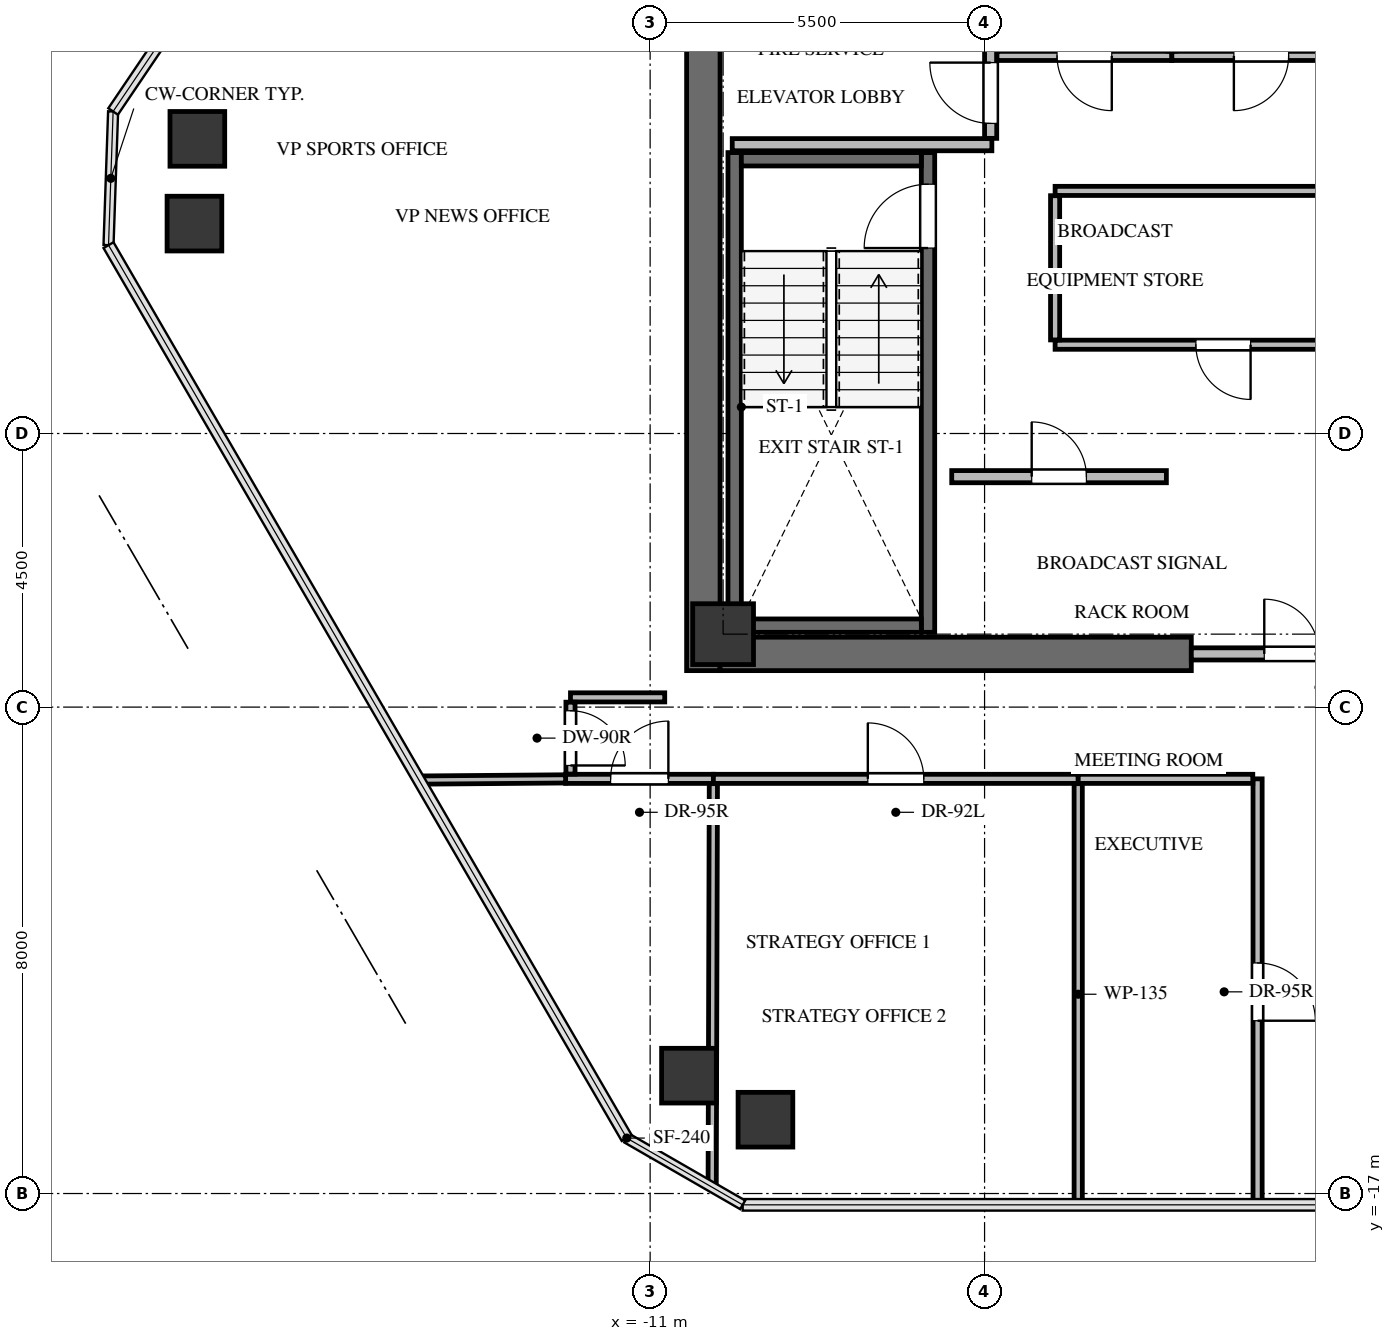
"""IFC4 building model, lengths in metres.
Left out: names, types, materials, properties, quantities, classifications, styles, units other than length and angle.
Written with IfcOpenShell. Run it as: python <this file> out.ifc"""

import sys

from ifc_helpers import new_model, si_unit, direction, frame, frame_2d, origin, origin_2d, place, context, subcontext, project, spatial, rectangle, extrude, source, transform, mapped, element, fill, save


model = new_model("IFC4")
c1 = context("Model", 3, precision=1e-05, world=origin(), true_north=direction((0.0, 1.0)))
c2 = subcontext(c1, "Body", "Model", "MODEL_VIEW")
j1 = project(units=[si_unit("LENGTHUNIT", "METRE"), si_unit("PLANEANGLEUNIT", "RADIAN")], contexts=[c1])
p1 = place(None, origin())
s1 = spatial("IfcSite", under=j1, at=p1, CompositionType="ELEMENT")
p2 = place(p1, origin())
s2 = spatial("IfcBuilding", under=s1, at=p2, CompositionType="ELEMENT")
p3 = place(p2, frame((0.0, 0.0, 228.2)))
s3 = spatial("IfcBuildingStorey", under=s2, at=p3, CompositionType="ELEMENT", Elevation=228.2)
p4 = place(p3, frame((-10.125, -8.4, 0.0), z_axis=(0.0, 0.0, 1.0), x_axis=(0.0, 1.0, 0.0)))
e1 = element("IfcWall", 1, at=p4, inside=s3, PredefinedType="SHEAR", context=c2, shape_type="SweptSolid", body=[
    extrude(rectangle(XDim=16.8, YDim=0.55, at=frame_2d((8.4, 0.0))), origin(), (0.0, 0.0, 1.0), 3.3),
])
p5 = place(p3, frame((-9.85, -8.125, 0.0), z_axis=(0.0, 0.0, 1.0), x_axis=(1.0, 0.0, 0.0)))
e2 = element("IfcWall", 2, at=p5, inside=s3, PredefinedType="SHEAR", context=c2, shape_type="SweptSolid", body=[
    extrude(rectangle(XDim=7.75, YDim=0.55, at=frame_2d((3.875, 0.0))), origin(), (0.0, 0.0, 1.0), 3.3),
])
p6 = place(p3, frame((-6.43, -7.77, -0.24), z_axis=(0.0, 0.0, 1.0), x_axis=(0.0, 1.0, 0.0)))
e3 = element("IfcWall", 3, at=p6, inside=s3, PredefinedType="SHEAR", context=c2, shape_type="SweptSolid", body=[
    extrude(rectangle(XDim=7.89, YDim=0.22, at=frame_2d((3.945, 0.0))), origin(), (0.0, 0.0, 1.0), 3.3),
])
p7 = place(p6, frame((6.32, 0.0, 0.0)))
e4 = element("IfcOpeningElement", 4, at=p7, cuts=e3, PredefinedType="OPENING", context=c2, shape_type="SweptSolid", body=[
    extrude(rectangle(XDim=1.05, YDim=2.15, at=frame_2d((0.525, 1.075))), frame((0.0, 0.12, 0.0), z_axis=(0.0, -1.0, 0.0), x_axis=(1.0, 0.0, 0.0)), (0.0, 0.0, 1.0), 0.24),
])
p8 = place(p3, frame((-9.61, 0.12, -0.24), z_axis=(0.0, 0.0, 1.0), x_axis=(0.0, -1.0, 0.0)))
e5 = element("IfcWall", 5, at=p8, inside=s3, PredefinedType="SHEAR", context=c2, shape_type="SweptSolid", body=[
    extrude(rectangle(XDim=7.89, YDim=0.22, at=frame_2d((3.945, 0.0))), origin(), (0.0, 0.0, 1.0), 3.3),
])
for number, where, z_axis, x_axis in (
    (6, (-9.5, -7.66, -0.24), (0.0, 0.0, 1.0), (1.0, 0.0, 0.0)),
    (7, (-6.54, 0.01, -0.24), (0.0, 0.0, 1.0), (-1.0, 0.0, 0.0)),
):
    element("IfcWall", number, at=place(p3, frame(where, z_axis=z_axis, x_axis=x_axis)), inside=s3, PredefinedType="SHEAR", context=c2, shape_type="SweptSolid", body=[
        extrude(rectangle(XDim=2.96, YDim=0.22, at=frame_2d((1.48, 0.0))), origin(), (0.0, 0.0, 1.0), 3.3),
    ])
m1 = source(origin(), c2, "Body", "SweptSolid", [
    extrude(rectangle(XDim=1.0, YDim=1.0, at=origin_2d()), origin(), (0.0, 0.0, 1.0), 3.3),
])
p9 = place(p3, frame((-9.8, -7.8, -0.24), z_axis=(0.0, 0.0, 1.0), x_axis=(1.0, 0.0, 0.0)))
e8 = element("IfcColumn", 8, at=p9, inside=s3, PredefinedType="COLUMN", context=c2, shape_type="MappedRepresentation", body=[
    mapped(m1, transform((0.0, 0.0, 0.0), x_axis=(1.0, 0.0, 0.0), y_axis=(0.0, 1.0, 0.0), z_axis=(0.0, 0.0, 1.0), scale=1.0)),
])
m2 = source(origin(), c2, "Body", "SweptSolid", [
    extrude(rectangle(XDim=0.9, YDim=0.9, at=origin_2d()), origin(), (0.0, 0.0, 1.0), 3.3),
])
for number, where, z_axis, x_axis in (
    (9, (-10.361, -15.062, -0.24), (0.0, 0.0, 1.0), (1.0, 0.0, 0.0)),
    (10, (-18.494, -1.048, -0.24), (0.0, 0.0, 1.0), (1.0, 0.0, 0.0)),
    (11, (-18.446, 0.346, -0.24), (0.0, 0.0, 1.0), (1.0, 0.0, 0.0)),
    (12, (-9.104, -15.786, -0.24), (0.0, 0.0, 1.0), (1.0, 0.0, 0.0)),
):
    element("IfcColumn", number, at=place(p3, frame(where, z_axis=z_axis, x_axis=x_axis)), inside=s3, PredefinedType="COLUMN", context=c2, shape_type="MappedRepresentation", body=[
        mapped(m2, transform((0.0, 0.0, 0.0), x_axis=(1.0, 0.0, 0.0), y_axis=(0.0, 1.0, 0.0), z_axis=(0.0, 0.0, 1.0), scale=1.0)),
    ])
p10 = place(p3, frame((-2.1, -8.125, 0.0), z_axis=(0.0, 0.0, 1.0), x_axis=(1.0, 0.0, 0.0)))
e13 = element("IfcWall", 13, at=p10, inside=s3, PredefinedType="SOLIDWALL", context=c2, shape_type="SweptSolid", body=[
    extrude(rectangle(XDim=4.2, YDim=0.2, at=frame_2d((2.1, 0.0))), origin(), (0.0, 0.0, 1.0), 3.045),
])
p11 = place(p10, frame((1.2, 0.0, 0.0)))
e14 = element("IfcOpeningElement", 14, at=p11, cuts=e13, PredefinedType="OPENING", context=c2, shape_type="SweptSolid", body=[
    extrude(rectangle(XDim=1.8, YDim=2.15, at=frame_2d((0.9, 1.075))), frame((0.0, 0.11, 0.0), z_axis=(0.0, -1.0, 0.0), x_axis=(1.0, 0.0, 0.0)), (0.0, 0.0, 1.0), 0.22),
])
p12 = place(p3, frame((-9.65, 0.25, 0.0), z_axis=(0.0, 0.0, 1.0), x_axis=(1.0, 0.0, 0.0)))
e15 = element("IfcWall", 15, at=p12, inside=s3, PredefinedType="SOLIDWALL", context=c2, shape_type="SweptSolid", body=[
    extrude(rectangle(XDim=4.27, YDim=0.2, at=frame_2d((2.135, 0.0))), origin(), (0.0, 0.0, 1.0), 3.045),
])
p13 = place(p3, frame((-5.4, 0.354, 0.0), z_axis=(0.0, 0.0, 1.0), x_axis=(0.0, 1.0, 0.0)))
e16 = element("IfcWall", 16, at=p13, inside=s3, PredefinedType="SOLIDWALL", context=c2, shape_type="SweptSolid", body=[
    extrude(rectangle(XDim=4.026, YDim=0.2, at=frame_2d((2.013, 0.0))), origin(), (0.0, 0.0, 1.0), 3.045),
])
p14 = place(p13, frame((0.246, 0.0, 0.0)))
e17 = element("IfcOpeningElement", 17, at=p14, cuts=e16, PredefinedType="OPENING", context=c2, shape_type="SweptSolid", body=[
    extrude(rectangle(XDim=1.0, YDim=2.15, at=frame_2d((0.5, 1.075))), frame((0.0, 0.11, 0.0), z_axis=(0.0, -1.0, 0.0), x_axis=(1.0, 0.0, 0.0)), (0.0, 0.0, 1.0), 0.22),
])
p15 = place(p3, frame((-6.04, -5.21, 0.0), z_axis=(0.0, 0.0, 1.0), x_axis=(1.0, 0.0, 0.0)))
e18 = element("IfcWall", 18, at=p15, inside=s3, PredefinedType="SOLIDWALL", context=c2, shape_type="SweptSolid", body=[
    extrude(rectangle(XDim=3.53, YDim=0.2, at=frame_2d((1.765, 0.0))), origin(), (0.0, 0.0, 1.0), 3.045),
])
p16 = place(p15, frame((1.315, 0.0, 0.0)))
e19 = element("IfcOpeningElement", 19, at=p16, cuts=e18, PredefinedType="OPENING", context=c2, shape_type="SweptSolid", body=[
    extrude(rectangle(XDim=0.9, YDim=2.05, at=frame_2d((0.45, 1.025))), frame((0.0, 0.11, 0.0), z_axis=(0.0, -1.0, 0.0), x_axis=(1.0, 0.0, 0.0)), (0.0, 0.0, 1.0), 0.22),
])
p17 = place(p3, frame((1.19, -3.04, 0.0), z_axis=(0.0, 0.0, 1.0), x_axis=(-1.0, 0.0, 0.0)))
e20 = element("IfcWall", 20, at=p17, inside=s3, PredefinedType="PARTITIONING", context=c2, shape_type="SweptSolid", body=[
    extrude(rectangle(XDim=5.53, YDim=0.15, at=frame_2d((2.765, 0.0))), origin(), (0.0, 0.0, 1.0), 3.045),
])
p18 = place(p17, frame((2.315, 0.0, 0.0)))
e21 = element("IfcOpeningElement", 21, at=p18, cuts=e20, PredefinedType="OPENING", context=c2, shape_type="SweptSolid", body=[
    extrude(rectangle(XDim=0.9, YDim=2.05, at=frame_2d((0.45, 1.025))), frame((0.0, 0.085, 0.0), z_axis=(0.0, -1.0, 0.0), x_axis=(1.0, 0.0, 0.0)), (0.0, 0.0, 1.0), 0.17),
])
p19 = place(p3, frame((-4.34, -0.51, 0.0), z_axis=(0.0, 0.0, 1.0), x_axis=(1.0, 0.0, 0.0)))
e22 = element("IfcWall", 22, at=p19, inside=s3, PredefinedType="PARTITIONING", context=c2, shape_type="SweptSolid", body=[
    extrude(rectangle(XDim=5.53, YDim=0.15, at=frame_2d((2.765, 0.0))), origin(), (0.0, 0.0, 1.0), 3.045),
])
p20 = place(p3, frame((-4.34, -2.961, 0.0), z_axis=(0.0, 0.0, 1.0), x_axis=(0.0, 1.0, 0.0)))
e23 = element("IfcWall", 23, at=p20, inside=s3, PredefinedType="PARTITIONING", context=c2, shape_type="SweptSolid", body=[
    extrude(rectangle(XDim=2.372, YDim=0.15, at=frame_2d((1.186, 0.0))), origin(), (0.0, 0.0, 1.0), 3.045),
])
p21 = place(p3, frame((-2.42, 1.71, 0.0), z_axis=(0.0, 0.0, 1.0), x_axis=(-1.0, 0.0, 0.0)))
e24 = element("IfcWall", 24, at=p21, inside=s3, PredefinedType="PARTITIONING", context=c2, shape_type="SweptSolid", body=[
    extrude(rectangle(XDim=2.876, YDim=0.15, at=frame_2d((1.438, 0.0))), origin(), (0.0, 0.0, 1.0), 3.045),
])
p22 = place(p21, frame((0.988, 0.0, 0.0)))
e25 = element("IfcOpeningElement", 25, at=p22, cuts=e24, PredefinedType="OPENING", context=c2, shape_type="SweptSolid", body=[
    extrude(rectangle(XDim=0.9, YDim=2.05, at=frame_2d((0.45, 1.025))), frame((0.0, 0.085, 0.0), z_axis=(0.0, -1.0, 0.0), x_axis=(1.0, 0.0, 0.0)), (0.0, 0.0, 1.0), 0.17),
])
p23 = place(p3, frame((0.52, 1.71, 0.0), z_axis=(0.0, 0.0, 1.0), x_axis=(-1.0, 0.0, 0.0)))
e26 = element("IfcWall", 26, at=p23, inside=s3, PredefinedType="PARTITIONING", context=c2, shape_type="SweptSolid", body=[
    extrude(rectangle(XDim=2.94, YDim=0.15, at=frame_2d((1.47, 0.0))), origin(), (0.0, 0.0, 1.0), 3.045),
])
p24 = place(p23, frame((1.02, 0.0, 0.0)))
e27 = element("IfcOpeningElement", 27, at=p24, cuts=e26, PredefinedType="OPENING", context=c2, shape_type="SweptSolid", body=[
    extrude(rectangle(XDim=0.9, YDim=2.05, at=frame_2d((0.45, 1.025))), frame((0.0, 0.085, 0.0), z_axis=(0.0, -1.0, 0.0), x_axis=(1.0, 0.0, 0.0)), (0.0, 0.0, 1.0), 0.17),
])
p25 = place(p3, frame((-12.39, -10.18, 0.0), z_axis=(0.0, 0.0, 1.0), x_axis=(1.0, 0.0, 0.0)))
e28 = element("IfcWall", 28, at=p25, inside=s3, PredefinedType="PARTITIONING", context=c2, shape_type="SweptSolid", body=[
    extrude(rectangle(XDim=2.43, YDim=0.15, at=frame_2d((1.215, 0.0))), origin(), (0.0, 0.0, 1.0), 3.045),
])
p26 = place(p25, frame((0.74, 0.0, 0.0)))
e29 = element("IfcOpeningElement", 29, at=p26, cuts=e28, PredefinedType="OPENING", context=c2, shape_type="SweptSolid", body=[
    extrude(rectangle(XDim=0.95, YDim=2.1, at=frame_2d((0.475, 1.05))), frame((0.0, 0.085, 0.0), z_axis=(0.0, -1.0, 0.0), x_axis=(1.0, 0.0, 0.0)), (0.0, 0.0, 1.0), 0.17),
])
p27 = place(p3, frame((-9.96, -10.18, 0.0), z_axis=(0.0, 0.0, 1.0), x_axis=(1.0, 0.0, 0.0)))
e30 = element("IfcWall", 30, at=p27, inside=s3, PredefinedType="PARTITIONING", context=c2, shape_type="SweptSolid", body=[
    extrude(rectangle(XDim=6.0, YDim=0.15, at=frame_2d((3.0, 0.0))), origin(), (0.0, 0.0, 1.0), 2.301),
])
p28 = place(p27, frame((2.54, 0.0, 0.0)))
e31 = element("IfcOpeningElement", 31, at=p28, cuts=e30, PredefinedType="OPENING", context=c2, shape_type="SweptSolid", body=[
    extrude(rectangle(XDim=0.92, YDim=2.1, at=frame_2d((0.46, 1.05))), frame((0.0, 0.085, 0.0), z_axis=(0.0, -1.0, 0.0), x_axis=(1.0, 0.0, 0.0)), (0.0, 0.0, 1.0), 0.17),
])
p29 = place(p3, frame((-1.01, -10.18, 0.0), z_axis=(0.0, 0.0, 1.0), x_axis=(0.0, -1.0, 0.0)))
e32 = element("IfcWall", 32, at=p29, inside=s3, PredefinedType="PARTITIONING", context=c2, shape_type="SweptSolid", body=[
    extrude(rectangle(XDim=7.006, YDim=0.15, at=frame_2d((3.503, 0.0))), origin(), (0.0, 0.0, 1.0), 2.399),
])
p30 = place(p29, frame((3.028, 0.0, 0.0)))
e33 = element("IfcOpeningElement", 33, at=p30, cuts=e32, PredefinedType="OPENING", context=c2, shape_type="SweptSolid", body=[
    extrude(rectangle(XDim=0.95, YDim=2.1, at=frame_2d((0.475, 1.05))), frame((0.0, 0.085, 0.0), z_axis=(0.0, -1.0, 0.0), x_axis=(1.0, 0.0, 0.0)), (0.0, 0.0, 1.0), 0.17),
])
p31 = place(p3, frame((-3.96, -10.18, 0.0), z_axis=(0.0, 0.0, 1.0), x_axis=(1.0, 0.0, 0.0)))
e34 = element("IfcWall", 34, at=p31, inside=s3, PredefinedType="PARTITIONING", context=c2, shape_type="SweptSolid", body=[
    extrude(rectangle(XDim=2.871, YDim=0.15, at=frame_2d((1.436, 0.0))), origin(), (0.0, 0.0, 1.0), 3.045),
])
p32 = place(p3, frame((-10.76, -8.84, 0.0), z_axis=(0.0, 0.0, 1.0), x_axis=(-1.0, 0.0, 0.0)))
e35 = element("IfcWall", 35, at=p32, inside=s3, PredefinedType="PARTITIONING", context=c2, shape_type="SweptSolid", body=[
    extrude(rectangle(XDim=1.55, YDim=0.15, at=frame_2d((0.775, 0.0))), origin(), (0.0, 0.0, 1.0), 3.045),
])
p33 = place(p3, frame((-12.31, -8.919, 0.0), z_axis=(0.0, 0.0, 1.0), x_axis=(0.0, -1.0, 0.0)))
e36 = element("IfcWall", 36, at=p33, inside=s3, PredefinedType="PARTITIONING", context=c2, shape_type="SweptSolid", body=[
    extrude(rectangle(XDim=1.182, YDim=0.15, at=frame_2d((0.591, 0.0))), origin(), (0.0, 0.0, 1.0), 3.045),
])
p34 = place(p33, frame((0.141, 0.0, 0.0)))
e37 = element("IfcOpeningElement", 37, at=p34, cuts=e36, PredefinedType="OPENING", context=c2, shape_type="SweptSolid", body=[
    extrude(rectangle(XDim=0.9, YDim=2.05, at=frame_2d((0.45, 1.025))), frame((0.0, 0.085, 0.0), z_axis=(0.0, -1.0, 0.0), x_axis=(1.0, 0.0, 0.0)), (0.0, 0.0, 1.0), 0.17),
])
p35 = place(p3, frame((-9.96, -10.259, 0.0), z_axis=(0.0, 0.0, 1.0), x_axis=(-0.002979132758, -0.999995562374, 0.0)))
e38 = element("IfcWall", 38, at=p35, inside=s3, PredefinedType="PARTITIONING", context=c2, shape_type="SweptSolid", body=[
    extrude(rectangle(XDim=6.638, YDim=0.135, at=frame_2d((3.319, 0.0))), origin(), (0.0, 0.0, 1.0), 2.301),
])
p36 = place(p3, frame((-14.802, -10.2, 0.0), z_axis=(0.0, 0.0, 1.0), x_axis=(0.999968020968, 0.007997314604, 0.0)))
e39 = element("IfcWall", 39, at=p36, inside=s3, PredefinedType="PARTITIONING", context=c2, shape_type="SweptSolid", body=[
    extrude(rectangle(XDim=2.412, YDim=0.135, at=frame_2d((1.206, 0.0))), origin(), (0.0, 0.0, 1.0), 2.399),
])
p37 = place(p3, frame((-3.96, -10.259, 0.0), z_axis=(0.0, 0.0, 1.0), x_axis=(0.0, -1.0, 0.0)))
e40 = element("IfcWall", 40, at=p37, inside=s3, PredefinedType="PARTITIONING", context=c2, shape_type="SweptSolid", body=[
    extrude(rectangle(XDim=6.927, YDim=0.135, at=frame_2d((3.463, 0.0))), origin(), (0.0, 0.0, 1.0), 2.399),
])
m3 = source(origin(), c2, "Body", "SweptSolid", [
    extrude(rectangle(XDim=1.05, YDim=2.15, at=frame_2d((0.525, 1.075))), frame((0.0, 0.025, 0.0), z_axis=(0.0, -1.0, 0.0), x_axis=(1.0, 0.0, 0.0)), (0.0, 0.0, 1.0), 0.05),
])
p38 = place(p7, origin())
e41 = element("IfcDoor", 41, at=p38, inside=s3, OperationType="SINGLE_SWING_LEFT", PredefinedType="DOOR", context=c2, shape_type="MappedRepresentation", body=[
    mapped(m3, transform((0.0, 0.0, 0.0), x_axis=(1.0, 0.0, 0.0), y_axis=(0.0, 1.0, 0.0), z_axis=(0.0, 0.0, 1.0), scale=1.0)),
])
fill(e4, e41)
m4 = source(origin(), c2, "Body", "SweptSolid", [
    extrude(rectangle(XDim=1.8, YDim=2.15, at=frame_2d((0.9, 1.075))), frame((0.0, 0.025, 0.0), z_axis=(0.0, -1.0, 0.0), x_axis=(1.0, 0.0, 0.0)), (0.0, 0.0, 1.0), 0.05),
])
p39 = place(p11, origin())
e42 = element("IfcDoor", 42, at=p39, inside=s3, OperationType="DOUBLE_DOOR_SINGLE_SWING", PredefinedType="DOOR", context=c2, shape_type="MappedRepresentation", body=[
    mapped(m4, transform((0.0, 0.0, 0.0), x_axis=(1.0, 0.0, 0.0), y_axis=(0.0, 1.0, 0.0), z_axis=(0.0, 0.0, 1.0), scale=1.0)),
])
fill(e14, e42)
m5 = source(origin(), c2, "Body", "SweptSolid", [
    extrude(rectangle(XDim=1.0, YDim=2.15, at=frame_2d((0.5, 1.075))), frame((0.0, 0.025, 0.0), z_axis=(0.0, -1.0, 0.0), x_axis=(1.0, 0.0, 0.0)), (0.0, 0.0, 1.0), 0.05),
])
p40 = place(p14, origin())
e43 = element("IfcDoor", 43, at=p40, inside=s3, OperationType="SINGLE_SWING_RIGHT", PredefinedType="DOOR", context=c2, shape_type="MappedRepresentation", body=[
    mapped(m5, transform((0.0, 0.0, 0.0), x_axis=(1.0, 0.0, 0.0), y_axis=(0.0, 1.0, 0.0), z_axis=(0.0, 0.0, 1.0), scale=1.0)),
])
fill(e17, e43)
m6 = source(origin(), c2, "Body", "SweptSolid", [
    extrude(rectangle(XDim=0.9, YDim=2.05, at=frame_2d((0.45, 1.025))), frame((0.0, 0.025, 0.0), z_axis=(0.0, -1.0, 0.0), x_axis=(1.0, 0.0, 0.0)), (0.0, 0.0, 1.0), 0.05),
])
p41 = place(p16, origin())
e44 = element("IfcDoor", 44, at=p41, inside=s3, OperationType="SINGLE_SWING_LEFT", PredefinedType="DOOR", context=c2, shape_type="MappedRepresentation", body=[
    mapped(m6, transform((0.0, 0.0, 0.0), x_axis=(1.0, 0.0, 0.0), y_axis=(0.0, 1.0, 0.0), z_axis=(0.0, 0.0, 1.0), scale=1.0)),
])
fill(e19, e44)
p42 = place(p18, origin())
e45 = element("IfcDoor", 45, at=p42, inside=s3, OperationType="SINGLE_SWING_LEFT", PredefinedType="DOOR", context=c2, shape_type="MappedRepresentation", body=[
    mapped(m6, transform((0.0, 0.0, 0.0), x_axis=(1.0, 0.0, 0.0), y_axis=(0.0, 1.0, 0.0), z_axis=(0.0, 0.0, 1.0), scale=1.0)),
])
fill(e21, e45)
p43 = place(p22, origin())
e46 = element("IfcDoor", 46, at=p43, inside=s3, OperationType="SINGLE_SWING_LEFT", PredefinedType="DOOR", context=c2, shape_type="MappedRepresentation", body=[
    mapped(m6, transform((0.0, 0.0, 0.0), x_axis=(1.0, 0.0, 0.0), y_axis=(0.0, 1.0, 0.0), z_axis=(0.0, 0.0, 1.0), scale=1.0)),
])
fill(e25, e46)
m7 = source(origin(), c2, "Body", "SweptSolid", [
    extrude(rectangle(XDim=0.9, YDim=2.05, at=frame_2d((0.45, 1.025))), frame((0.0, 0.025, 0.0), z_axis=(0.0, -1.0, 0.0), x_axis=(1.0, 0.0, 0.0)), (0.0, 0.0, 1.0), 0.05),
])
p44 = place(p24, origin())
e47 = element("IfcDoor", 47, at=p44, inside=s3, OperationType="SINGLE_SWING_RIGHT", PredefinedType="DOOR", context=c2, shape_type="MappedRepresentation", body=[
    mapped(m7, transform((0.0, 0.0, 0.0), x_axis=(1.0, 0.0, 0.0), y_axis=(0.0, 1.0, 0.0), z_axis=(0.0, 0.0, 1.0), scale=1.0)),
])
fill(e27, e47)
m8 = source(origin(), c2, "Body", "SweptSolid", [
    extrude(rectangle(XDim=0.95, YDim=2.1, at=frame_2d((0.475, 1.05))), frame((0.0, 0.025, 0.0), z_axis=(0.0, -1.0, 0.0), x_axis=(1.0, 0.0, 0.0)), (0.0, 0.0, 1.0), 0.05),
])
p45 = place(p26, origin())
e48 = element("IfcDoor", 48, at=p45, inside=s3, OperationType="SINGLE_SWING_RIGHT", PredefinedType="DOOR", context=c2, shape_type="MappedRepresentation", body=[
    mapped(m8, transform((0.0, 0.0, 0.0), x_axis=(1.0, 0.0, 0.0), y_axis=(0.0, 1.0, 0.0), z_axis=(0.0, 0.0, 1.0), scale=1.0)),
])
fill(e29, e48)
m9 = source(origin(), c2, "Body", "SweptSolid", [
    extrude(rectangle(XDim=0.92, YDim=2.1, at=frame_2d((0.46, 1.05))), frame((0.0, 0.025, 0.0), z_axis=(0.0, -1.0, 0.0), x_axis=(1.0, 0.0, 0.0)), (0.0, 0.0, 1.0), 0.05),
])
p46 = place(p28, origin())
e49 = element("IfcDoor", 49, at=p46, inside=s3, OperationType="SINGLE_SWING_LEFT", PredefinedType="DOOR", context=c2, shape_type="MappedRepresentation", body=[
    mapped(m9, transform((0.0, 0.0, 0.0), x_axis=(1.0, 0.0, 0.0), y_axis=(0.0, 1.0, 0.0), z_axis=(0.0, 0.0, 1.0), scale=1.0)),
])
fill(e31, e49)
p47 = place(p30, origin())
e50 = element("IfcDoor", 50, at=p47, inside=s3, OperationType="SINGLE_SWING_RIGHT", PredefinedType="DOOR", context=c2, shape_type="MappedRepresentation", body=[
    mapped(m8, transform((0.0, 0.0, 0.0), x_axis=(1.0, 0.0, 0.0), y_axis=(0.0, 1.0, 0.0), z_axis=(0.0, 0.0, 1.0), scale=1.0)),
])
fill(e33, e50)
m10 = source(origin(), c2, "Body", "SweptSolid", [
    extrude(rectangle(XDim=0.9, YDim=2.05, at=frame_2d((0.45, 1.025))), frame((0.0, 0.025, 0.0), z_axis=(0.0, -1.0, 0.0), x_axis=(1.0, 0.0, 0.0)), (0.0, 0.0, 1.0), 0.05),
])
p48 = place(p34, origin())
e51 = element("IfcDoor", 51, at=p48, inside=s3, OperationType="SINGLE_SWING_RIGHT", PredefinedType="DOOR", context=c2, shape_type="MappedRepresentation", body=[
    mapped(m10, transform((0.0, 0.0, 0.0), x_axis=(1.0, 0.0, 0.0), y_axis=(0.0, 1.0, 0.0), z_axis=(0.0, 0.0, 1.0), scale=1.0)),
])
fill(e37, e51)
save(model, sys.argv[1])
